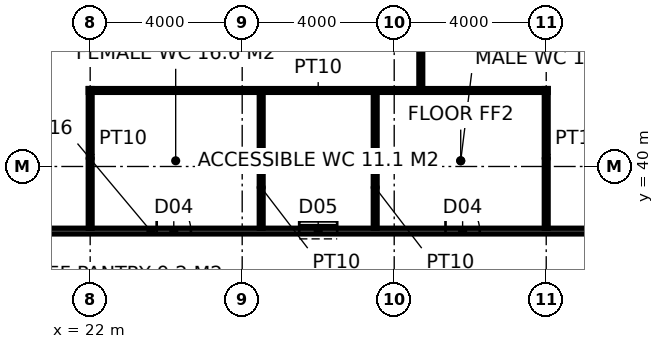
"""IFC4 building model, lengths in metres.
Left out: names, types, materials, properties, quantities, classifications, styles, units other than length and angle.
Written with IfcOpenShell. Run it as: python <this file> out.ifc"""

import sys

from ifc_helpers import new_model, si_unit, direction, frame, frame_2d, origin, place, context, subcontext, project, spatial, rectangle, extrude, element, fill, save


model = new_model("IFC4")
c1 = context("Model", 3, precision=1e-05, world=origin(), true_north=direction((0.0, 1.0)))
c2 = subcontext(c1, "Body", "Model", "MODEL_VIEW")
j1 = project(units=[si_unit("LENGTHUNIT", "METRE"), si_unit("PLANEANGLEUNIT", "RADIAN")], contexts=[c1])
p1 = place(None, origin())
s1 = spatial("IfcSite", under=j1, at=p1, CompositionType="ELEMENT")
p2 = place(p1, origin())
s2 = spatial("IfcBuilding", under=s1, at=p2, CompositionType="ELEMENT")
p3 = place(p2, frame((0.0, 0.0, 113.4)))
s3 = spatial("IfcBuildingStorey", under=s2, at=p3, CompositionType="ELEMENT", Elevation=113.4)
p4 = place(p3, frame((17.5, 38.3, 0.0), z_axis=(0.0, 0.0, 1.0), x_axis=(1.0, 0.0, 0.0)))
e1 = element("IfcWall", 1, at=p4, inside=s3, PredefinedType="PARTITIONING", context=c2, shape_type="SweptSolid", body=[
    extrude(rectangle(XDim=20.325, YDim=0.15, at=frame_2d((10.163, 0.0))), origin(), (0.0, 0.0, 1.0), 3.85),
])
p5 = place(p4, frame((6.25, 0.0, 0.0)))
e2 = element("IfcOpeningElement", 2, at=p5, cuts=e1, PredefinedType="OPENING", context=c2, shape_type="SweptSolid", body=[
    extrude(rectangle(XDim=0.9, YDim=2.1, at=frame_2d((0.45, 1.05))), frame((0.0, 0.085, 0.0), z_axis=(0.0, -1.0, 0.0), x_axis=(1.0, 0.0, 0.0)), (0.0, 0.0, 1.0), 0.17),
])
p6 = place(p4, frame((10.0, 0.0, 0.0)))
e3 = element("IfcOpeningElement", 3, at=p6, cuts=e1, PredefinedType="OPENING", context=c2, shape_type="SweptSolid", body=[
    extrude(rectangle(XDim=1.0, YDim=2.1, at=frame_2d((0.5, 1.05))), frame((0.0, 0.085, 0.0), z_axis=(0.0, -1.0, 0.0), x_axis=(1.0, 0.0, 0.0)), (0.0, 0.0, 1.0), 0.17),
])
p7 = place(p4, frame((13.85, 0.0, 0.0)))
e4 = element("IfcOpeningElement", 4, at=p7, cuts=e1, PredefinedType="OPENING", context=c2, shape_type="SweptSolid", body=[
    extrude(rectangle(XDim=0.9, YDim=2.1, at=frame_2d((0.45, 1.05))), frame((0.0, 0.085, 0.0), z_axis=(0.0, -1.0, 0.0), x_axis=(1.0, 0.0, 0.0)), (0.0, 0.0, 1.0), 0.17),
])
for number, where, z_axis, x_axis in (
    (5, (22.0, 38.375, 0.0), (0.0, 0.0, 1.0), (0.0, 1.0, 0.0)),
    (6, (34.0, 38.375, 0.0), (0.0, 0.0, 1.0), (0.0, 1.0, 0.0)),
):
    element("IfcWall", number, at=place(p3, frame(where, z_axis=z_axis, x_axis=x_axis)), inside=s3, PredefinedType="PARTITIONING", context=c2, shape_type="SweptSolid", body=[
        extrude(rectangle(XDim=3.675, YDim=0.1, at=frame_2d((1.837, 0.0))), origin(), (0.0, 0.0, 1.0), 2.95),
    ])
p8 = place(p3, frame((21.95, 42.0, 0.0), z_axis=(0.0, 0.0, 1.0), x_axis=(1.0, 0.0, 0.0)))
e7 = element("IfcWall", 7, at=p8, inside=s3, PredefinedType="PARTITIONING", context=c2, shape_type="SweptSolid", body=[
    extrude(rectangle(XDim=12.1, YDim=0.1, at=frame_2d((6.05, 0.0))), origin(), (0.0, 0.0, 1.0), 3.85),
])
for number, where, z_axis, x_axis in (
    (8, (26.5, 38.375, 0.0), (0.0, 0.0, 1.0), (0.0, 1.0, 0.0)),
    (9, (29.5, 38.375, 0.0), (0.0, 0.0, 1.0), (0.0, 1.0, 0.0)),
):
    element("IfcWall", number, at=place(p3, frame(where, z_axis=z_axis, x_axis=x_axis)), inside=s3, PredefinedType="PARTITIONING", context=c2, shape_type="SweptSolid", body=[
        extrude(rectangle(XDim=3.575, YDim=0.1, at=frame_2d((1.788, 0.0))), origin(), (0.0, 0.0, 1.0), 3.85),
    ])
p9 = place(p3, frame((30.7, 42.0, 0.0), z_axis=(0.0, 0.0, 1.0), x_axis=(0.0, 1.0, 0.0)))
e10 = element("IfcWall", 10, at=p9, inside=s3, PredefinedType="PARTITIONING", context=c2, shape_type="SweptSolid", body=[
    extrude(rectangle(XDim=9.7, YDim=0.1, at=frame_2d((4.85, 0.0))), origin(), (0.0, 0.0, 1.0), 3.85),
])
p10 = place(p9, frame((4.35, 0.0, 0.0)))
e11 = element("IfcOpeningElement", 11, at=p10, cuts=e10, PredefinedType="OPENING", context=c2, shape_type="SweptSolid", body=[
    extrude(rectangle(XDim=1.0, YDim=2.2, at=frame_2d((0.5, 1.1))), frame((0.0, 0.06, 0.0), z_axis=(0.0, -1.0, 0.0), x_axis=(1.0, 0.0, 0.0)), (0.0, 0.0, 1.0), 0.12),
])
p11 = place(p5, origin())
e12 = element("IfcDoor", 12, at=p11, inside=s3, OperationType="SINGLE_SWING_LEFT", PredefinedType="DOOR", context=c2, shape_type="SweptSolid", body=[
    extrude(rectangle(XDim=0.9, YDim=2.1, at=frame_2d((0.45, 1.05))), frame((0.0, 0.025, 0.0), z_axis=(0.0, -1.0, 0.0), x_axis=(1.0, 0.0, 0.0)), (0.0, 0.0, 1.0), 0.05),
])
fill(e2, e12)
p12 = place(p6, origin())
e13 = element("IfcDoor", 13, at=p12, inside=s3, OperationType="SLIDING_TO_LEFT", PredefinedType="DOOR", context=c2, shape_type="SweptSolid", body=[
    extrude(rectangle(XDim=1.0, YDim=2.1, at=frame_2d((0.5, 1.05))), frame((0.0, 0.025, 0.0), z_axis=(0.0, -1.0, 0.0), x_axis=(1.0, 0.0, 0.0)), (0.0, 0.0, 1.0), 0.05),
])
fill(e3, e13)
p13 = place(p7, origin())
e14 = element("IfcDoor", 14, at=p13, inside=s3, OperationType="SINGLE_SWING_LEFT", PredefinedType="DOOR", context=c2, shape_type="SweptSolid", body=[
    extrude(rectangle(XDim=0.9, YDim=2.1, at=frame_2d((0.45, 1.05))), frame((0.0, 0.025, 0.0), z_axis=(0.0, -1.0, 0.0), x_axis=(1.0, 0.0, 0.0)), (0.0, 0.0, 1.0), 0.05),
])
fill(e4, e14)
save(model, sys.argv[1])
